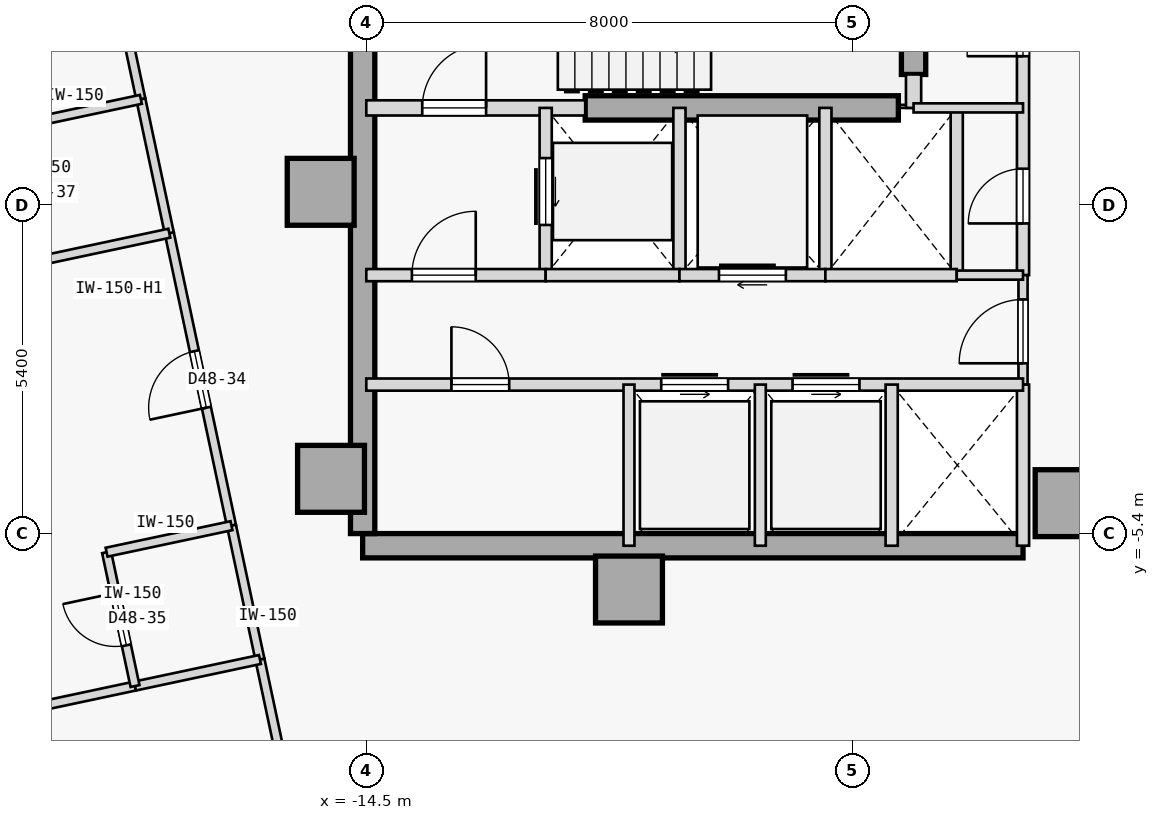
"""IFC4 building model, lengths in metres.
Left out: names, types, materials, properties, quantities, classifications, styles, units other than length and angle.
Written with IfcOpenShell. Run it as: python <this file> out.ifc"""

import sys

from ifc_helpers import new_model, si_unit, direction, frame, frame_2d, origin, origin_2d, place, context, subcontext, project, spatial, rectangle, extrude, element, fill, save


model = new_model("IFC4")
c1 = context("Model", 3, precision=1e-05, world=origin(), true_north=direction((0.0, 1.0)))
c2 = subcontext(c1, "Body", "Model", "MODEL_VIEW")
j1 = project(units=[si_unit("LENGTHUNIT", "METRE"), si_unit("PLANEANGLEUNIT", "RADIAN")], contexts=[c1])
p1 = place(None, origin())
s1 = spatial("IfcSite", under=j1, at=p1, CompositionType="ELEMENT")
p2 = place(p1, origin())
s2 = spatial("IfcBuilding", under=s1, at=p2, CompositionType="ELEMENT")
p3 = place(p2, frame((0.0, 0.0, 185.4)))
s3 = spatial("IfcBuildingStorey", under=s2, at=p3, CompositionType="ELEMENT", Elevation=185.4)
for number, where, z_axis, x_axis in (
    (1, (-15.25, 0.22, 0.0), (0.0, 0.0, 1.0), (1.0, 0.0, 0.0)),
    (2, (-15.08, -4.5, 0.0), (0.0, 0.0, 1.0), (1.0, 0.0, 0.0)),
    (3, (-10.18, -6.32, 0.0), (0.0, 0.0, 1.0), (1.0, 0.0, 0.0)),
    (4, (-2.95, -4.9, 0.0), (0.0, 0.0, 1.0), (1.0, 0.0, 0.0)),
):
    element("IfcColumn", number, at=place(p3, frame(where, z_axis=z_axis, x_axis=x_axis)), inside=s3, PredefinedType="COLUMN", context=c2, shape_type="SweptSolid", body=[
        extrude(rectangle(XDim=1.1, YDim=1.1, at=origin_2d()), origin(), (0.0, 0.0, 1.0), 3.4),
    ])
p4 = place(p3, frame((-14.56, -5.6, 0.0), z_axis=(0.0, 0.0, 1.0), x_axis=(1.0, 0.0, 0.0)))
e5 = element("IfcWall", 5, at=p4, inside=s3, PredefinedType="SHEAR", context=c2, shape_type="SweptSolid", body=[
    extrude(rectangle(XDim=10.86, YDim=0.4, at=frame_2d((5.43, 0.0))), origin(), (0.0, 0.0, 1.0), 3.175),
])
p5 = place(p3, frame((-14.56, -5.4, 0.0), z_axis=(0.0, 0.0, 1.0), x_axis=(0.0, 1.0, 0.0)))
e6 = element("IfcWall", 6, at=p5, inside=s3, PredefinedType="SHEAR", context=c2, shape_type="SweptSolid", body=[
    extrude(rectangle(XDim=10.8, YDim=0.4, at=frame_2d((5.4, 0.0))), origin(), (0.0, 0.0, 1.0), 3.175),
])
p6 = place(p3, frame((-5.5, 2.15, 0.0), z_axis=(0.0, 0.0, 1.0), x_axis=(0.0, 1.0, 0.0)))
e7 = element("IfcWall", 7, at=p6, inside=s3, PredefinedType="SHEAR", context=c2, shape_type="SweptSolid", body=[
    extrude(rectangle(XDim=3.25, YDim=0.4, at=frame_2d((1.625, 0.0))), origin(), (0.0, 0.0, 1.0), 3.175),
])
p7 = place(p3, frame((-10.9, 1.6, 0.0), z_axis=(0.0, 0.0, 1.0), x_axis=(1.0, 0.0, 0.0)))
e8 = element("IfcWall", 8, at=p7, inside=s3, PredefinedType="SHEAR", context=c2, shape_type="SweptSolid", body=[
    extrude(rectangle(XDim=5.15, YDim=0.4, at=frame_2d((2.575, 0.0))), origin(), (0.0, 0.0, 1.0), 3.175),
])
p8 = place(p3, frame((-14.5, 1.6, 0.0), z_axis=(0.0, 0.0, 1.0), x_axis=(1.0, 0.0, 0.0)))
e9 = element("IfcWall", 9, at=p8, inside=s3, PredefinedType="STANDARD", context=c2, shape_type="SweptSolid", body=[
    extrude(rectangle(XDim=3.6, YDim=0.25, at=frame_2d((1.8, 0.0))), origin(), (0.0, 0.0, 1.0), 3.175),
])
p9 = place(p8, frame((0.92, 0.0, 0.0)))
e10 = element("IfcOpeningElement", 10, at=p9, cuts=e9, PredefinedType="OPENING", context=c2, shape_type="SweptSolid", body=[
    extrude(rectangle(XDim=1.05, YDim=2.15, at=frame_2d((0.525, 1.075))), frame((0.0, 0.135, 0.0), z_axis=(0.0, -1.0, 0.0), x_axis=(1.0, 0.0, 0.0)), (0.0, 0.0, 1.0), 0.27),
])
p10 = place(p3, frame((-5.5, 1.6, 0.0), z_axis=(0.0, 0.0, 1.0), x_axis=(0.0, 1.0, 0.0)))
e11 = element("IfcWall", 11, at=p10, inside=s3, PredefinedType="STANDARD", context=c2, shape_type="SweptSolid", body=[
    extrude(rectangle(XDim=0.55, YDim=0.25, at=frame_2d((0.275, 0.0))), origin(), (0.0, 0.0, 1.0), 3.175),
])
p11 = place(p3, frame((-3.7, -1.15, 0.0), z_axis=(0.0, 0.0, 1.0), x_axis=(0.0, 1.0, 0.0)))
e12 = element("IfcWall", 12, at=p11, inside=s3, PredefinedType="STANDARD", context=c2, shape_type="SweptSolid", body=[
    extrude(rectangle(XDim=6.75, YDim=0.2, at=frame_2d((3.375, 0.0))), origin(), (0.0, 0.0, 1.0), 3.175),
])
p12 = place(p11, frame((3.6, 0.0, 0.0)))
e13 = element("IfcOpeningElement", 13, at=p12, cuts=e12, PredefinedType="OPENING", context=c2, shape_type="SweptSolid", body=[
    extrude(rectangle(XDim=0.92, YDim=2.15, at=frame_2d((0.46, 1.075))), frame((0.0, 0.11, 0.0), z_axis=(0.0, -1.0, 0.0), x_axis=(1.0, 0.0, 0.0)), (0.0, 0.0, 1.0), 0.22),
])
p13 = place(p11, frame((0.85, 0.0, 0.0)))
e14 = element("IfcOpeningElement", 14, at=p13, cuts=e12, PredefinedType="OPENING", context=c2, shape_type="SweptSolid", body=[
    extrude(rectangle(XDim=0.9, YDim=2.15, at=frame_2d((0.45, 1.075))), frame((0.0, 0.11, 0.0), z_axis=(0.0, -1.0, 0.0), x_axis=(1.0, 0.0, 0.0)), (0.0, 0.0, 1.0), 0.22),
])
p14 = place(p3, frame((-3.7, -2.95, 0.0), z_axis=(0.0, 0.0, 1.0), x_axis=(0.0, 1.0, 0.0)))
e15 = element("IfcWall", 15, at=p14, inside=s3, PredefinedType="PARTITIONING", context=c2, shape_type="SweptSolid", body=[
    extrude(rectangle(XDim=1.8, YDim=0.15, at=frame_2d((0.9, 0.0))), origin(), (0.0, 0.0, 1.0), 3.175),
])
p15 = place(p14, frame((0.35, 0.0, 0.0)))
e16 = element("IfcOpeningElement", 16, at=p15, cuts=e15, PredefinedType="OPENING", context=c2, shape_type="SweptSolid", body=[
    extrude(rectangle(XDim=1.05, YDim=2.18, at=frame_2d((0.525, 1.09))), frame((0.0, 0.085, 0.0), z_axis=(0.0, -1.0, 0.0), x_axis=(1.0, 0.0, 0.0)), (0.0, 0.0, 1.0), 0.17),
])
p16 = place(p3, frame((-3.7, -5.6, 0.0), z_axis=(0.0, 0.0, 1.0), x_axis=(0.0, 1.0, 0.0)))
e17 = element("IfcWall", 17, at=p16, inside=s3, PredefinedType="STANDARD", context=c2, shape_type="SweptSolid", body=[
    extrude(rectangle(XDim=2.65, YDim=0.2, at=frame_2d((1.325, 0.0))), origin(), (0.0, 0.0, 1.0), 3.175),
])
p17 = place(p3, frame((-11.55, -1.15, 0.0), z_axis=(0.0, 0.0, 1.0), x_axis=(0.0, 1.0, 0.0)))
e18 = element("IfcWall", 18, at=p17, inside=s3, PredefinedType="STANDARD", context=c2, shape_type="SweptSolid", body=[
    extrude(rectangle(XDim=2.75, YDim=0.2, at=frame_2d((1.375, 0.0))), origin(), (0.0, 0.0, 1.0), 3.175),
])
p18 = place(p17, frame((0.825, 0.0, 0.0)))
e19 = element("IfcOpeningElement", 19, at=p18, cuts=e18, PredefinedType="OPENING", context=c2, shape_type="SweptSolid", body=[
    extrude(rectangle(XDim=1.1, YDim=2.15, at=frame_2d((0.55, 1.075))), frame((0.0, 0.11, 0.0), z_axis=(0.0, -1.0, 0.0), x_axis=(1.0, 0.0, 0.0)), (0.0, 0.0, 1.0), 0.22),
])
p19 = place(p3, frame((-9.35, -1.15, 0.0), z_axis=(0.0, 0.0, 1.0), x_axis=(0.0, 1.0, 0.0)))
e20 = element("IfcWall", 20, at=p19, inside=s3, PredefinedType="STANDARD", context=c2, shape_type="SweptSolid", body=[
    extrude(rectangle(XDim=2.75, YDim=0.2, at=frame_2d((1.375, 0.0))), origin(), (0.0, 0.0, 1.0), 3.175),
])
p20 = place(p3, frame((-14.5, -1.15, 0.0), z_axis=(0.0, 0.0, 1.0), x_axis=(1.0, 0.0, 0.0)))
e21 = element("IfcWall", 21, at=p20, inside=s3, PredefinedType="STANDARD", context=c2, shape_type="SweptSolid", body=[
    extrude(rectangle(XDim=2.95, YDim=0.2, at=frame_2d((1.475, 0.0))), origin(), (0.0, 0.0, 1.0), 3.175),
])
p21 = place(p20, frame((0.75, 0.0, 0.0)))
e22 = element("IfcOpeningElement", 22, at=p21, cuts=e21, PredefinedType="OPENING", context=c2, shape_type="SweptSolid", body=[
    extrude(rectangle(XDim=1.05, YDim=2.18, at=frame_2d((0.525, 1.09))), frame((0.0, 0.11, 0.0), z_axis=(0.0, -1.0, 0.0), x_axis=(1.0, 0.0, 0.0)), (0.0, 0.0, 1.0), 0.22),
])
p22 = place(p3, frame((-11.55, -1.15, 0.0), z_axis=(0.0, 0.0, 1.0), x_axis=(1.0, 0.0, 0.0)))
e23 = element("IfcWall", 23, at=p22, inside=s3, PredefinedType="STANDARD", context=c2, shape_type="SweptSolid", body=[
    extrude(rectangle(XDim=2.2, YDim=0.2, at=frame_2d((1.1, 0.0))), origin(), (0.0, 0.0, 1.0), 3.175),
])
p23 = place(p3, frame((-6.95, -1.15, 0.0), z_axis=(0.0, 0.0, 1.0), x_axis=(0.0, 1.0, 0.0)))
e24 = element("IfcWall", 24, at=p23, inside=s3, PredefinedType="STANDARD", context=c2, shape_type="SweptSolid", body=[
    extrude(rectangle(XDim=2.75, YDim=0.2, at=frame_2d((1.375, 0.0))), origin(), (0.0, 0.0, 1.0), 3.175),
])
p24 = place(p3, frame((-9.35, -1.15, 0.0), z_axis=(0.0, 0.0, 1.0), x_axis=(1.0, 0.0, 0.0)))
e25 = element("IfcWall", 25, at=p24, inside=s3, PredefinedType="STANDARD", context=c2, shape_type="SweptSolid", body=[
    extrude(rectangle(XDim=2.4, YDim=0.2, at=frame_2d((1.2, 0.0))), origin(), (0.0, 0.0, 1.0), 3.175),
])
p25 = place(p24, frame((0.65, 0.0, 0.0)))
e26 = element("IfcOpeningElement", 26, at=p25, cuts=e25, PredefinedType="OPENING", context=c2, shape_type="SweptSolid", body=[
    extrude(rectangle(XDim=1.1, YDim=2.15, at=frame_2d((0.55, 1.075))), frame((0.0, 0.11, 0.0), z_axis=(0.0, -1.0, 0.0), x_axis=(1.0, 0.0, 0.0)), (0.0, 0.0, 1.0), 0.22),
])
p26 = place(p3, frame((-4.79, -1.15, 0.0), z_axis=(0.0, 0.0, 1.0), x_axis=(0.0, 1.0, 0.0)))
e27 = element("IfcWall", 27, at=p26, inside=s3, PredefinedType="STANDARD", context=c2, shape_type="SweptSolid", body=[
    extrude(rectangle(XDim=2.75, YDim=0.2, at=frame_2d((1.375, 0.0))), origin(), (0.0, 0.0, 1.0), 3.175),
])
p27 = place(p3, frame((-6.95, -1.15, 0.0), z_axis=(0.0, 0.0, 1.0), x_axis=(1.0, 0.0, 0.0)))
e28 = element("IfcWall", 28, at=p27, inside=s3, PredefinedType="STANDARD", context=c2, shape_type="SweptSolid", body=[
    extrude(rectangle(XDim=2.16, YDim=0.2, at=frame_2d((1.08, 0.0))), origin(), (0.0, 0.0, 1.0), 3.175),
])
p28 = place(p3, frame((-4.79, -1.15, 0.0), z_axis=(0.0, 0.0, 1.0), x_axis=(1.0, 0.0, 0.0)))
e29 = element("IfcWall", 29, at=p28, inside=s3, PredefinedType="PARTITIONING", context=c2, shape_type="SweptSolid", body=[
    extrude(rectangle(XDim=1.09, YDim=0.15, at=frame_2d((0.545, 0.0))), origin(), (0.0, 0.0, 1.0), 3.175),
])
p29 = place(p3, frame((-14.5, -2.95, 0.0), z_axis=(0.0, 0.0, 1.0), x_axis=(1.0, 0.0, 0.0)))
e30 = element("IfcWall", 30, at=p29, inside=s3, PredefinedType="STANDARD", context=c2, shape_type="SweptSolid", body=[
    extrude(rectangle(XDim=10.8, YDim=0.2, at=frame_2d((5.4, 0.0))), origin(), (0.0, 0.0, 1.0), 3.175),
])
p30 = place(p29, frame((4.85, 0.0, 0.0)))
e31 = element("IfcOpeningElement", 31, at=p30, cuts=e30, PredefinedType="OPENING", context=c2, shape_type="SweptSolid", body=[
    extrude(rectangle(XDim=1.1, YDim=2.15, at=frame_2d((0.55, 1.075))), frame((0.0, 0.11, 0.0), z_axis=(0.0, -1.0, 0.0), x_axis=(1.0, 0.0, 0.0)), (0.0, 0.0, 1.0), 0.22),
])
p31 = place(p29, frame((7.01, 0.0, 0.0)))
e32 = element("IfcOpeningElement", 32, at=p31, cuts=e30, PredefinedType="OPENING", context=c2, shape_type="SweptSolid", body=[
    extrude(rectangle(XDim=1.1, YDim=2.15, at=frame_2d((0.55, 1.075))), frame((0.0, 0.11, 0.0), z_axis=(0.0, -1.0, 0.0), x_axis=(1.0, 0.0, 0.0)), (0.0, 0.0, 1.0), 0.22),
])
p32 = place(p29, frame((1.4, 0.0, 0.0)))
e33 = element("IfcOpeningElement", 33, at=p32, cuts=e30, PredefinedType="OPENING", context=c2, shape_type="SweptSolid", body=[
    extrude(rectangle(XDim=0.95, YDim=2.15, at=frame_2d((0.475, 1.075))), frame((0.0, 0.11, 0.0), z_axis=(0.0, -1.0, 0.0), x_axis=(1.0, 0.0, 0.0)), (0.0, 0.0, 1.0), 0.22),
])
p33 = place(p3, frame((-5.86, -5.6, 0.0), z_axis=(0.0, 0.0, 1.0), x_axis=(0.0, 1.0, 0.0)))
e34 = element("IfcWall", 34, at=p33, inside=s3, PredefinedType="STANDARD", context=c2, shape_type="SweptSolid", body=[
    extrude(rectangle(XDim=2.65, YDim=0.2, at=frame_2d((1.325, 0.0))), origin(), (0.0, 0.0, 1.0), 3.175),
])
for number, where, z_axis, x_axis in (
    (35, (-10.18, -5.6, 0.0), (0.0, 0.0, 1.0), (0.0, 1.0, 0.0)),
    (36, (-8.02, -5.6, 0.0), (0.0, 0.0, 1.0), (0.0, 1.0, 0.0)),
):
    element("IfcWall", number, at=place(p3, frame(where, z_axis=z_axis, x_axis=x_axis)), inside=s3, PredefinedType="STANDARD", context=c2, shape_type="SweptSolid", body=[
        extrude(rectangle(XDim=2.65, YDim=0.18, at=frame_2d((1.325, 0.0))), origin(), (0.0, 0.0, 1.0), 3.175),
    ])
p34 = place(p3, frame((-5.5, 1.6, 0.0), z_axis=(0.0, 0.0, 1.0), x_axis=(1.0, 0.0, 0.0)))
e37 = element("IfcWall", 37, at=p34, inside=s3, PredefinedType="PARTITIONING", context=c2, shape_type="SweptSolid", body=[
    extrude(rectangle(XDim=1.8, YDim=0.15, at=frame_2d((0.9, 0.0))), origin(), (0.0, 0.0, 1.0), 3.175),
])
p35 = place(p3, frame((-15.227, -12.279, 0.0), z_axis=(0.0, 0.0, 1.0), x_axis=(-0.20794488256, 0.978140545023, 0.0)))
e38 = element("IfcWall", 38, at=p35, inside=s3, PredefinedType="PARTITIONING", context=c2, shape_type="SweptSolid", body=[
    extrude(rectangle(XDim=4.916, YDim=0.15, at=frame_2d((2.458, 0.0))), origin(), (0.0, 0.0, 1.0), 3.175),
])
p36 = place(p35, frame((1.983, 0.0, 0.0)))
e39 = element("IfcOpeningElement", 39, at=p36, cuts=e38, PredefinedType="OPENING", context=c2, shape_type="SweptSolid", body=[
    extrude(rectangle(XDim=0.95, YDim=2.15, at=frame_2d((0.475, 1.075))), frame((0.0, 0.085, 0.0), z_axis=(0.0, -1.0, 0.0), x_axis=(1.0, 0.0, 0.0)), (0.0, 0.0, 1.0), 0.17),
])
p37 = place(p3, frame((-16.717, -5.27, 0.0), z_axis=(0.0, 0.0, 1.0), x_axis=(-0.207894386012, 0.978151278824, 0.0)))
e40 = element("IfcWall", 40, at=p37, inside=s3, PredefinedType="PARTITIONING", context=c2, shape_type="SweptSolid", body=[
    extrude(rectangle(XDim=4.917, YDim=0.15, at=frame_2d((2.458, 0.0))), origin(), (0.0, 0.0, 1.0), 3.175),
])
p38 = place(p37, frame((1.983, 0.0, 0.0)))
e41 = element("IfcOpeningElement", 41, at=p38, cuts=e40, PredefinedType="OPENING", context=c2, shape_type="SweptSolid", body=[
    extrude(rectangle(XDim=0.95, YDim=2.15, at=frame_2d((0.475, 1.075))), frame((0.0, 0.085, 0.0), z_axis=(0.0, -1.0, 0.0), x_axis=(1.0, 0.0, 0.0)), (0.0, 0.0, 1.0), 0.17),
])
p39 = place(p3, frame((-16.249, -7.471, 0.0), z_axis=(0.0, 0.0, 1.0), x_axis=(-0.207891197838, 0.978151956427, 0.0)))
e42 = element("IfcWall", 42, at=p39, inside=s3, PredefinedType="PARTITIONING", context=c2, shape_type="SweptSolid", body=[
    extrude(rectangle(XDim=2.25, YDim=0.15, at=frame_2d((1.125, 0.0))), origin(), (0.0, 0.0, 1.0), 3.175),
])
p40 = place(p3, frame((-18.207, 1.74, 0.0), z_axis=(0.0, 0.0, 1.0), x_axis=(-0.20793874598, 0.97814184959, 0.0)))
e43 = element("IfcWall", 43, at=p40, inside=s3, PredefinedType="PARTITIONING", context=c2, shape_type="SweptSolid", body=[
    extrude(rectangle(XDim=4.855, YDim=0.15, at=frame_2d((2.427, 0.0))), origin(), (0.0, 0.0, 1.0), 3.175),
])
p41 = place(p40, frame((1.952, 0.0, 0.0)))
e44 = element("IfcOpeningElement", 44, at=p41, cuts=e43, PredefinedType="OPENING", context=c2, shape_type="SweptSolid", body=[
    extrude(rectangle(XDim=0.95, YDim=2.15, at=frame_2d((0.475, 1.075))), frame((0.0, 0.085, 0.0), z_axis=(0.0, -1.0, 0.0), x_axis=(1.0, 0.0, 0.0)), (0.0, 0.0, 1.0), 0.17),
])
p42 = place(p3, frame((-17.739, -0.46, 0.0), z_axis=(0.0, 0.0, 1.0), x_axis=(-0.207891197838, 0.978151956427, 0.0)))
e45 = element("IfcWall", 45, at=p42, inside=s3, PredefinedType="PARTITIONING", context=c2, shape_type="SweptSolid", body=[
    extrude(rectangle(XDim=2.25, YDim=0.15, at=frame_2d((1.125, 0.0))), origin(), (0.0, 0.0, 1.0), 3.175),
])
p43 = place(p3, frame((-33.678, -11.175, 0.0), z_axis=(0.0, 0.0, 1.0), x_axis=(0.978149296727, 0.207903711638, 0.0)))
e46 = element("IfcWall", 46, at=p43, inside=s3, PredefinedType="PARTITIONING", context=c2, shape_type="SweptSolid", body=[
    extrude(rectangle(XDim=15.718, YDim=0.15, at=frame_2d((7.859, 0.0))), origin(), (0.0, 0.0, 1.0), 3.175),
])
p44 = place(p3, frame((-18.303, -7.907, 0.0), z_axis=(0.0, 0.0, 1.0), x_axis=(0.978153236239, 0.207885176084, 0.0)))
e47 = element("IfcWall", 47, at=p44, inside=s3, PredefinedType="PARTITIONING", context=c2, shape_type="SweptSolid", body=[
    extrude(rectangle(XDim=2.1, YDim=0.15, at=frame_2d((1.05, 0.0))), origin(), (0.0, 0.0, 1.0), 3.175),
])
p45 = place(p3, frame((-18.303, -7.907, 0.0), z_axis=(0.0, 0.0, 1.0), x_axis=(-0.207891197838, 0.978151956427, 0.0)))
e48 = element("IfcWall", 48, at=p45, inside=s3, PredefinedType="PARTITIONING", context=c2, shape_type="SweptSolid", body=[
    extrude(rectangle(XDim=2.25, YDim=0.15, at=frame_2d((1.125, 0.0))), origin(), (0.0, 0.0, 1.0), 3.175),
])
p46 = place(p45, frame((0.685, 0.0, 0.0)))
e49 = element("IfcOpeningElement", 49, at=p46, cuts=e48, PredefinedType="OPENING", context=c2, shape_type="SweptSolid", body=[
    extrude(rectangle(XDim=0.88, YDim=2.15, at=frame_2d((0.44, 1.075))), frame((0.0, 0.085, 0.0), z_axis=(0.0, -1.0, 0.0), x_axis=(1.0, 0.0, 0.0)), (0.0, 0.0, 1.0), 0.17),
])
p47 = place(p3, frame((-18.771, -5.707, 0.0), z_axis=(0.0, 0.0, 1.0), x_axis=(0.978153236239, 0.207885176084, 0.0)))
e50 = element("IfcWall", 50, at=p47, inside=s3, PredefinedType="PARTITIONING", context=c2, shape_type="SweptSolid", body=[
    extrude(rectangle(XDim=2.1, YDim=0.15, at=frame_2d((1.05, 0.0))), origin(), (0.0, 0.0, 1.0), 3.175),
])
p48 = place(p3, frame((-19.793, -0.897, 0.0), z_axis=(0.0, 0.0, 1.0), x_axis=(0.978134617382, 0.207972763311, 0.0)))
e51 = element("IfcWall", 51, at=p48, inside=s3, PredefinedType="PARTITIONING", context=c2, shape_type="SweptSolid", body=[
    extrude(rectangle(XDim=2.1, YDim=0.15, at=frame_2d((1.05, 0.0))), origin(), (0.0, 0.0, 1.0), 2.725),
])
p49 = place(p3, frame((-20.261, 1.304, 0.0), z_axis=(0.0, 0.0, 1.0), x_axis=(0.978134617382, 0.207972763311, 0.0)))
e52 = element("IfcWall", 52, at=p49, inside=s3, PredefinedType="PARTITIONING", context=c2, shape_type="SweptSolid", body=[
    extrude(rectangle(XDim=2.1, YDim=0.15, at=frame_2d((1.05, 0.0))), origin(), (0.0, 0.0, 1.0), 3.175),
])
p50 = place(p9, origin())
e53 = element("IfcDoor", 53, at=p50, inside=s3, OperationType="SINGLE_SWING_RIGHT", PredefinedType="DOOR", context=c2, shape_type="SweptSolid", body=[
    extrude(rectangle(XDim=1.05, YDim=2.15, at=frame_2d((0.525, 1.075))), frame((0.0, 0.025, 0.0), z_axis=(0.0, -1.0, 0.0), x_axis=(1.0, 0.0, 0.0)), (0.0, 0.0, 1.0), 0.05),
])
fill(e10, e53)
p51 = place(p21, origin())
e54 = element("IfcDoor", 54, at=p51, inside=s3, OperationType="SINGLE_SWING_RIGHT", PredefinedType="DOOR", context=c2, shape_type="SweptSolid", body=[
    extrude(rectangle(XDim=1.05, YDim=2.18, at=frame_2d((0.525, 1.09))), frame((0.0, 0.025, 0.0), z_axis=(0.0, -1.0, 0.0), x_axis=(1.0, 0.0, 0.0)), (0.0, 0.0, 1.0), 0.05),
])
fill(e22, e54)
p52 = place(p15, origin())
e55 = element("IfcDoor", 55, at=p52, inside=s3, OperationType="SINGLE_SWING_LEFT", PredefinedType="DOOR", context=c2, shape_type="SweptSolid", body=[
    extrude(rectangle(XDim=1.05, YDim=2.18, at=frame_2d((0.525, 1.09))), frame((0.0, 0.025, 0.0), z_axis=(0.0, -1.0, 0.0), x_axis=(1.0, 0.0, 0.0)), (0.0, 0.0, 1.0), 0.05),
])
fill(e16, e55)
p53 = place(p18, origin())
e56 = element("IfcDoor", 56, at=p53, inside=s3, OperationType="SLIDING_TO_RIGHT", PredefinedType="DOOR", context=c2, shape_type="SweptSolid", body=[
    extrude(rectangle(XDim=1.1, YDim=2.15, at=frame_2d((0.55, 1.075))), frame((0.0, 0.025, 0.0), z_axis=(0.0, -1.0, 0.0), x_axis=(1.0, 0.0, 0.0)), (0.0, 0.0, 1.0), 0.05),
])
fill(e19, e56)
p54 = place(p25, origin())
e57 = element("IfcDoor", 57, at=p54, inside=s3, OperationType="SLIDING_TO_RIGHT", PredefinedType="DOOR", context=c2, shape_type="SweptSolid", body=[
    extrude(rectangle(XDim=1.1, YDim=2.15, at=frame_2d((0.55, 1.075))), frame((0.0, 0.025, 0.0), z_axis=(0.0, -1.0, 0.0), x_axis=(1.0, 0.0, 0.0)), (0.0, 0.0, 1.0), 0.05),
])
fill(e26, e57)
p55 = place(p30, origin())
e58 = element("IfcDoor", 58, at=p55, inside=s3, OperationType="SLIDING_TO_LEFT", PredefinedType="DOOR", context=c2, shape_type="SweptSolid", body=[
    extrude(rectangle(XDim=1.1, YDim=2.15, at=frame_2d((0.55, 1.075))), frame((0.0, 0.025, 0.0), z_axis=(0.0, -1.0, 0.0), x_axis=(1.0, 0.0, 0.0)), (0.0, 0.0, 1.0), 0.05),
])
fill(e31, e58)
p56 = place(p31, origin())
e59 = element("IfcDoor", 59, at=p56, inside=s3, OperationType="SLIDING_TO_LEFT", PredefinedType="DOOR", context=c2, shape_type="SweptSolid", body=[
    extrude(rectangle(XDim=1.1, YDim=2.15, at=frame_2d((0.55, 1.075))), frame((0.0, 0.025, 0.0), z_axis=(0.0, -1.0, 0.0), x_axis=(1.0, 0.0, 0.0)), (0.0, 0.0, 1.0), 0.05),
])
fill(e32, e59)
p57 = place(p32, origin())
e60 = element("IfcDoor", 60, at=p57, inside=s3, OperationType="SINGLE_SWING_LEFT", PredefinedType="DOOR", context=c2, shape_type="SweptSolid", body=[
    extrude(rectangle(XDim=0.95, YDim=2.15, at=frame_2d((0.475, 1.075))), frame((0.0, 0.025, 0.0), z_axis=(0.0, -1.0, 0.0), x_axis=(1.0, 0.0, 0.0)), (0.0, 0.0, 1.0), 0.05),
])
fill(e33, e60)
p58 = place(p12, origin())
e61 = element("IfcDoor", 61, at=p58, inside=s3, OperationType="SINGLE_SWING_LEFT", PredefinedType="DOOR", context=c2, shape_type="SweptSolid", body=[
    extrude(rectangle(XDim=0.92, YDim=2.15, at=frame_2d((0.46, 1.075))), frame((0.0, 0.025, 0.0), z_axis=(0.0, -1.0, 0.0), x_axis=(1.0, 0.0, 0.0)), (0.0, 0.0, 1.0), 0.05),
])
fill(e13, e61)
p59 = place(p13, origin())
e62 = element("IfcDoor", 62, at=p59, inside=s3, OperationType="SINGLE_SWING_LEFT", PredefinedType="DOOR", context=c2, shape_type="SweptSolid", body=[
    extrude(rectangle(XDim=0.9, YDim=2.15, at=frame_2d((0.45, 1.075))), frame((0.0, 0.025, 0.0), z_axis=(0.0, -1.0, 0.0), x_axis=(1.0, 0.0, 0.0)), (0.0, 0.0, 1.0), 0.05),
])
fill(e14, e62)
p60 = place(p38, origin())
e63 = element("IfcDoor", 63, at=p60, inside=s3, OperationType="SINGLE_SWING_LEFT", PredefinedType="DOOR", context=c2, shape_type="SweptSolid", body=[
    extrude(rectangle(XDim=0.95, YDim=2.15, at=frame_2d((0.475, 1.075))), frame((0.0, 0.025, 0.0), z_axis=(0.0, -1.0, 0.0), x_axis=(1.0, 0.0, 0.0)), (0.0, 0.0, 1.0), 0.05),
])
fill(e41, e63)
p61 = place(p46, origin())
e64 = element("IfcDoor", 64, at=p61, inside=s3, OperationType="SINGLE_SWING_RIGHT", PredefinedType="DOOR", context=c2, shape_type="SweptSolid", body=[
    extrude(rectangle(XDim=0.88, YDim=2.15, at=frame_2d((0.44, 1.075))), frame((0.0, 0.025, 0.0), z_axis=(0.0, -1.0, 0.0), x_axis=(1.0, 0.0, 0.0)), (0.0, 0.0, 1.0), 0.05),
])
fill(e49, e64)
save(model, sys.argv[1])
